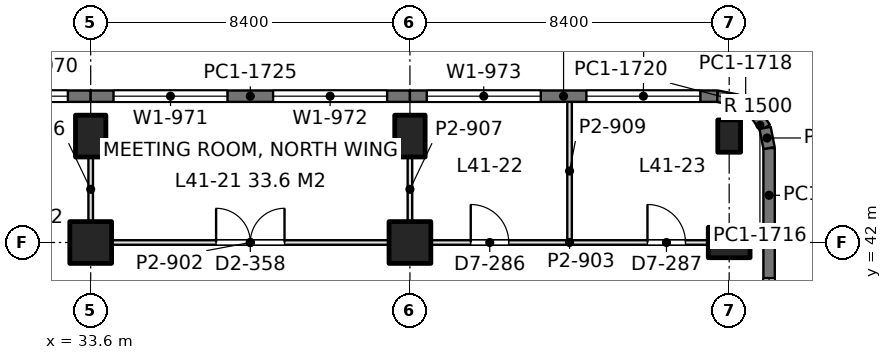
"""IFC4 building model, lengths in metres.
Left out: names, types, materials, properties, quantities, classifications, styles, units other than length and angle.
Written with IfcOpenShell. Run it as: python <this file> out.ifc"""

import sys

from ifc_helpers import new_model, si_unit, direction, frame, frame_2d, origin, origin_2d, place, context, subcontext, project, spatial, rectangle, extrude, element, fill, save


model = new_model("IFC4")
c1 = context("Model", 3, precision=1e-05, world=origin(), true_north=direction((0.0, 1.0)))
c2 = subcontext(c1, "Body", "Model", "MODEL_VIEW")
j1 = project(units=[si_unit("LENGTHUNIT", "METRE"), si_unit("PLANEANGLEUNIT", "RADIAN")], contexts=[c1])
p1 = place(None, origin())
s1 = spatial("IfcSite", under=j1, at=p1, CompositionType="ELEMENT")
p2 = place(p1, origin())
s2 = spatial("IfcBuilding", under=s1, at=p2, CompositionType="ELEMENT")
p3 = place(p2, frame((0.0, 0.0, 181.8)))
s3 = spatial("IfcBuildingStorey", under=s2, at=p3, CompositionType="ELEMENT", Elevation=181.8)
p4 = place(p3, frame((33.6, 42.0, 0.0), z_axis=(0.0, 0.0, 1.0), x_axis=(1.0, 0.0, 0.0)))
e1 = element("IfcColumn", 1, at=p4, inside=s3, PredefinedType="COLUMN", context=c2, shape_type="SweptSolid", body=[
    extrude(rectangle(XDim=1.1, YDim=1.1, at=origin_2d()), origin(), (0.0, 0.0, 1.0), 4.2),
])
p5 = place(p3, frame((33.6, 44.8, 0.0), z_axis=(0.0, 0.0, 1.0), x_axis=(1.0, 0.0, 0.0)))
e2 = element("IfcColumn", 2, at=p5, inside=s3, PredefinedType="COLUMN", context=c2, shape_type="SweptSolid", body=[
    extrude(rectangle(XDim=0.8, YDim=1.1, at=origin_2d()), origin(), (0.0, 0.0, 1.0), 4.2),
])
p6 = place(p3, frame((42.0, 42.0, 0.0), z_axis=(0.0, 0.0, 1.0), x_axis=(1.0, 0.0, 0.0)))
e3 = element("IfcColumn", 3, at=p6, inside=s3, PredefinedType="COLUMN", context=c2, shape_type="SweptSolid", body=[
    extrude(rectangle(XDim=1.1, YDim=1.1, at=origin_2d()), origin(), (0.0, 0.0, 1.0), 4.2),
])
for number, where, z_axis, x_axis in (
    (4, (42.0, 44.8, 0.0), (0.0, 0.0, 1.0), (1.0, 0.0, 0.0)),
    (5, (50.4, 42.0, 0.0), (0.0, 0.0, 1.0), (0.0, 1.0, 0.0)),
):
    element("IfcColumn", number, at=place(p3, frame(where, z_axis=z_axis, x_axis=x_axis)), inside=s3, PredefinedType="COLUMN", context=c2, shape_type="SweptSolid", body=[
        extrude(rectangle(XDim=0.8, YDim=1.1, at=origin_2d()), origin(), (0.0, 0.0, 1.0), 4.2),
    ])
p7 = place(p3, frame((50.4, 44.8, 0.0), z_axis=(0.0, 0.0, 1.0), x_axis=(1.0, 0.0, 0.0)))
e6 = element("IfcColumn", 6, at=p7, inside=s3, PredefinedType="COLUMN", context=c2, shape_type="SweptSolid", body=[
    extrude(rectangle(XDim=0.6, YDim=0.85, at=origin_2d()), origin(), (0.0, 0.0, 1.0), 4.2),
])
p8 = place(p3, frame((25.2, 45.85, 0.0), z_axis=(0.0, 0.0, 1.0), x_axis=(1.0, 0.0, 0.0)))
e7 = element("IfcWall", 7, at=p8, inside=s3, PredefinedType="SOLIDWALL", context=c2, shape_type="SweptSolid", body=[
    extrude(rectangle(XDim=8.4, YDim=0.3, at=frame_2d((4.2, 0.0))), origin(), (0.0, 0.0, 1.0), 4.05),
])
p9 = place(p8, frame((0.6, 0.0, 0.9)))
e8 = element("IfcOpeningElement", 8, at=p9, cuts=e7, PredefinedType="OPENING", context=c2, shape_type="SweptSolid", body=[
    extrude(rectangle(XDim=3.0, YDim=1.9, at=frame_2d((1.5, 0.95))), frame((0.0, 0.16, 0.0), z_axis=(0.0, -1.0, 0.0), x_axis=(1.0, 0.0, 0.0)), (0.0, 0.0, 1.0), 0.32),
])
p10 = place(p8, frame((4.8, 0.0, 0.9)))
e9 = element("IfcOpeningElement", 9, at=p10, cuts=e7, PredefinedType="OPENING", context=c2, shape_type="SweptSolid", body=[
    extrude(rectangle(XDim=3.0, YDim=1.9, at=frame_2d((1.5, 0.95))), frame((0.0, 0.16, 0.0), z_axis=(0.0, -1.0, 0.0), x_axis=(1.0, 0.0, 0.0)), (0.0, 0.0, 1.0), 0.32),
])
p11 = place(p3, frame((33.6, 45.85, 0.0), z_axis=(0.0, 0.0, 1.0), x_axis=(1.0, 0.0, 0.0)))
e10 = element("IfcWall", 10, at=p11, inside=s3, PredefinedType="SOLIDWALL", context=c2, shape_type="SweptSolid", body=[
    extrude(rectangle(XDim=8.4, YDim=0.3, at=frame_2d((4.2, 0.0))), origin(), (0.0, 0.0, 1.0), 4.05),
])
p12 = place(p11, frame((0.6, 0.0, 0.9)))
e11 = element("IfcOpeningElement", 11, at=p12, cuts=e10, PredefinedType="OPENING", context=c2, shape_type="SweptSolid", body=[
    extrude(rectangle(XDim=3.0, YDim=1.9, at=frame_2d((1.5, 0.95))), frame((0.0, 0.16, 0.0), z_axis=(0.0, -1.0, 0.0), x_axis=(1.0, 0.0, 0.0)), (0.0, 0.0, 1.0), 0.32),
])
p13 = place(p11, frame((4.8, 0.0, 0.9)))
e12 = element("IfcOpeningElement", 12, at=p13, cuts=e10, PredefinedType="OPENING", context=c2, shape_type="SweptSolid", body=[
    extrude(rectangle(XDim=3.0, YDim=1.9, at=frame_2d((1.5, 0.95))), frame((0.0, 0.16, 0.0), z_axis=(0.0, -1.0, 0.0), x_axis=(1.0, 0.0, 0.0)), (0.0, 0.0, 1.0), 0.32),
])
p14 = place(p3, frame((42.0, 45.85, 0.0), z_axis=(0.0, 0.0, 1.0), x_axis=(1.0, 0.0, 0.0)))
e13 = element("IfcWall", 13, at=p14, inside=s3, PredefinedType="SOLIDWALL", context=c2, shape_type="SweptSolid", body=[
    extrude(rectangle(XDim=8.085, YDim=0.3, at=frame_2d((4.042, 0.0))), origin(), (0.0, 0.0, 1.0), 4.05),
])
p15 = place(p14, frame((0.443, 0.0, 0.9)))
e14 = element("IfcOpeningElement", 14, at=p15, cuts=e13, PredefinedType="OPENING", context=c2, shape_type="SweptSolid", body=[
    extrude(rectangle(XDim=3.0, YDim=1.9, at=frame_2d((1.5, 0.95))), frame((0.0, 0.16, 0.0), z_axis=(0.0, -1.0, 0.0), x_axis=(1.0, 0.0, 0.0)), (0.0, 0.0, 1.0), 0.32),
])
p16 = place(p14, frame((4.643, 0.0, 0.9)))
e15 = element("IfcOpeningElement", 15, at=p16, cuts=e13, PredefinedType="OPENING", context=c2, shape_type="SweptSolid", body=[
    extrude(rectangle(XDim=3.0, YDim=1.9, at=frame_2d((1.5, 0.95))), frame((0.0, 0.16, 0.0), z_axis=(0.0, -1.0, 0.0), x_axis=(1.0, 0.0, 0.0)), (0.0, 0.0, 1.0), 0.32),
])
p17 = place(p3, frame((50.085, 45.85, 0.0), z_axis=(0.0, 0.0, 1.0), x_axis=(0.980702050465, -0.1955082817, 0.0)))
e16 = element("IfcWall", 16, at=p17, inside=s3, PredefinedType="SOLIDWALL", context=c2, shape_type="SweptSolid", body=[
    extrude(rectangle(XDim=0.541, YDim=0.3, at=frame_2d((0.271, 0.0))), origin(), (0.0, 0.0, 1.0), 4.05),
])
p18 = place(p3, frame((50.615, 45.744, 0.0), z_axis=(0.0, 0.0, 1.0), x_axis=(0.831692711774, -0.555236195849, 0.0)))
e17 = element("IfcWall", 17, at=p18, inside=s3, PredefinedType="SOLIDWALL", context=c2, shape_type="SweptSolid", body=[
    extrude(rectangle(XDim=0.525, YDim=0.3, at=frame_2d((0.263, 0.0))), origin(), (0.0, 0.0, 1.0), 4.05),
])
p19 = place(p3, frame((51.052, 45.453, 0.0), z_axis=(0.0, 0.0, 1.0), x_axis=(0.55534295404, -0.831621430339, 0.0)))
e18 = element("IfcWall", 18, at=p19, inside=s3, PredefinedType="SOLIDWALL", context=c2, shape_type="SweptSolid", body=[
    extrude(rectangle(XDim=0.526, YDim=0.3, at=frame_2d((0.263, 0.0))), origin(), (0.0, 0.0, 1.0), 4.05),
])
p20 = place(p3, frame((51.344, 45.015, 0.0), z_axis=(0.0, 0.0, 1.0), x_axis=(0.195073962632, -0.980788534345, 0.0)))
e19 = element("IfcWall", 19, at=p20, inside=s3, PredefinedType="SOLIDWALL", context=c2, shape_type="SweptSolid", body=[
    extrude(rectangle(XDim=0.541, YDim=0.3, at=frame_2d((0.271, 0.0))), origin(), (0.0, 0.0, 1.0), 4.05),
])
p21 = place(p3, frame((51.45, 44.485, 0.0), z_axis=(0.0, 0.0, 1.0), x_axis=(0.0, -1.0, 0.0)))
e20 = element("IfcWall", 20, at=p21, inside=s3, PredefinedType="SOLIDWALL", context=c2, shape_type="SweptSolid", body=[
    extrude(rectangle(XDim=2.485, YDim=0.3, at=frame_2d((1.243, 0.0))), origin(), (0.0, 0.0, 1.0), 4.05),
])
p22 = place(p3, frame((51.45, 42.0, 0.0), z_axis=(0.0, 0.0, 1.0), x_axis=(0.0, -1.0, 0.0)))
e21 = element("IfcWall", 21, at=p22, inside=s3, PredefinedType="SOLIDWALL", context=c2, shape_type="SweptSolid", body=[
    extrude(rectangle(XDim=4.275, YDim=0.3, at=frame_2d((2.137, 0.0))), origin(), (0.0, 0.0, 1.0), 4.05),
])
p23 = place(p22, frame((0.938, 0.0, 0.9)))
e22 = element("IfcOpeningElement", 22, at=p23, cuts=e21, PredefinedType="OPENING", context=c2, shape_type="SweptSolid", body=[
    extrude(rectangle(XDim=2.4, YDim=1.9, at=frame_2d((1.2, 0.95))), frame((0.0, 0.16, 0.0), z_axis=(0.0, -1.0, 0.0), x_axis=(1.0, 0.0, 0.0)), (0.0, 0.0, 1.0), 0.32),
])
p24 = place(p3, frame((34.149, 42.0, 0.0), z_axis=(0.0, 0.0, 1.0), x_axis=(1.0, 0.0, 0.0)))
e23 = element("IfcWall", 23, at=p24, inside=s3, PredefinedType="PARTITIONING", context=c2, shape_type="SweptSolid", body=[
    extrude(rectangle(XDim=7.302, YDim=0.12, at=frame_2d((3.651, 0.0))), origin(), (0.0, 0.0, 1.0), 3.55),
])
p25 = place(p24, frame((2.751, 0.0, 0.0)))
e24 = element("IfcOpeningElement", 24, at=p25, cuts=e23, PredefinedType="OPENING", context=c2, shape_type="SweptSolid", body=[
    extrude(rectangle(XDim=1.8, YDim=2.2, at=frame_2d((0.9, 1.1))), frame((0.0, 0.07, 0.0), z_axis=(0.0, -1.0, 0.0), x_axis=(1.0, 0.0, 0.0)), (0.0, 0.0, 1.0), 0.14),
])
p26 = place(p3, frame((42.549, 42.0, 0.0), z_axis=(0.0, 0.0, 1.0), x_axis=(1.0, 0.0, 0.0)))
e25 = element("IfcWall", 25, at=p26, inside=s3, PredefinedType="PARTITIONING", context=c2, shape_type="SweptSolid", body=[
    extrude(rectangle(XDim=7.302, YDim=0.12, at=frame_2d((3.651, 0.0))), origin(), (0.0, 0.0, 1.0), 3.55),
])
p27 = place(p26, frame((1.051, 0.0, 0.0)))
e26 = element("IfcOpeningElement", 26, at=p27, cuts=e25, PredefinedType="OPENING", context=c2, shape_type="SweptSolid", body=[
    extrude(rectangle(XDim=1.0, YDim=2.4, at=frame_2d((0.5, 1.2))), frame((0.0, 0.07, 0.0), z_axis=(0.0, -1.0, 0.0), x_axis=(1.0, 0.0, 0.0)), (0.0, 0.0, 1.0), 0.14),
])
p28 = place(p26, frame((5.701, 0.0, 0.0)))
e27 = element("IfcOpeningElement", 27, at=p28, cuts=e25, PredefinedType="OPENING", context=c2, shape_type="SweptSolid", body=[
    extrude(rectangle(XDim=1.0, YDim=2.4, at=frame_2d((0.5, 1.2))), frame((0.0, 0.07, 0.0), z_axis=(0.0, -1.0, 0.0), x_axis=(1.0, 0.0, 0.0)), (0.0, 0.0, 1.0), 0.14),
])
for number, where, z_axis, x_axis in (
    (28, (33.6, 42.549, 0.0), (0.0, 0.0, 1.0), (0.0, 1.0, 0.0)),
    (29, (42.0, 42.549, 0.0), (0.0, 0.0, 1.0), (0.0, 1.0, 0.0)),
):
    element("IfcWall", number, at=place(p3, frame(where, z_axis=z_axis, x_axis=x_axis)), inside=s3, PredefinedType="PARTITIONING", context=c2, shape_type="SweptSolid", body=[
        extrude(rectangle(XDim=1.702, YDim=0.12, at=frame_2d((0.851, 0.0))), origin(), (0.0, 0.0, 1.0), 3.69),
    ])
p29 = place(p3, frame((46.2, 42.058, 0.0), z_axis=(0.0, 0.0, 1.0), x_axis=(0.0, 1.0, 0.0)))
e30 = element("IfcWall", 30, at=p29, inside=s3, PredefinedType="PARTITIONING", context=c2, shape_type="SweptSolid", body=[
    extrude(rectangle(XDim=3.644, YDim=0.12, at=frame_2d((1.822, 0.0))), origin(), (0.0, 0.0, 1.0), 3.55),
])
p30 = place(p10, origin())
e31 = element("IfcWindow", 31, at=p30, inside=s3, PartitioningType="SINGLE_PANEL", PredefinedType="WINDOW", context=c2, shape_type="SweptSolid", body=[
    extrude(rectangle(XDim=3.0, YDim=1.9, at=frame_2d((1.5, 0.95))), frame((0.0, 0.03, 0.0), z_axis=(0.0, -1.0, 0.0), x_axis=(1.0, 0.0, 0.0)), (0.0, 0.0, 1.0), 0.06),
])
fill(e9, e31)
p31 = place(p12, origin())
e32 = element("IfcWindow", 32, at=p31, inside=s3, PartitioningType="SINGLE_PANEL", PredefinedType="WINDOW", context=c2, shape_type="SweptSolid", body=[
    extrude(rectangle(XDim=3.0, YDim=1.9, at=frame_2d((1.5, 0.95))), frame((0.0, 0.03, 0.0), z_axis=(0.0, -1.0, 0.0), x_axis=(1.0, 0.0, 0.0)), (0.0, 0.0, 1.0), 0.06),
])
fill(e11, e32)
p32 = place(p13, origin())
e33 = element("IfcWindow", 33, at=p32, inside=s3, PartitioningType="SINGLE_PANEL", PredefinedType="WINDOW", context=c2, shape_type="SweptSolid", body=[
    extrude(rectangle(XDim=3.0, YDim=1.9, at=frame_2d((1.5, 0.95))), frame((0.0, 0.03, 0.0), z_axis=(0.0, -1.0, 0.0), x_axis=(1.0, 0.0, 0.0)), (0.0, 0.0, 1.0), 0.06),
])
fill(e12, e33)
p33 = place(p15, origin())
e34 = element("IfcWindow", 34, at=p33, inside=s3, PartitioningType="SINGLE_PANEL", PredefinedType="WINDOW", context=c2, shape_type="SweptSolid", body=[
    extrude(rectangle(XDim=3.0, YDim=1.9, at=frame_2d((1.5, 0.95))), frame((0.0, 0.03, 0.0), z_axis=(0.0, -1.0, 0.0), x_axis=(1.0, 0.0, 0.0)), (0.0, 0.0, 1.0), 0.06),
])
fill(e14, e34)
p34 = place(p16, origin())
e35 = element("IfcWindow", 35, at=p34, inside=s3, PartitioningType="SINGLE_PANEL", PredefinedType="WINDOW", context=c2, shape_type="SweptSolid", body=[
    extrude(rectangle(XDim=3.0, YDim=1.9, at=frame_2d((1.5, 0.95))), frame((0.0, 0.03, 0.0), z_axis=(0.0, -1.0, 0.0), x_axis=(1.0, 0.0, 0.0)), (0.0, 0.0, 1.0), 0.06),
])
fill(e15, e35)
p35 = place(p23, origin())
e36 = element("IfcWindow", 36, at=p35, inside=s3, PartitioningType="SINGLE_PANEL", PredefinedType="WINDOW", context=c2, shape_type="SweptSolid", body=[
    extrude(rectangle(XDim=2.4, YDim=1.9, at=frame_2d((1.2, 0.95))), frame((0.0, 0.03, 0.0), z_axis=(0.0, -1.0, 0.0), x_axis=(1.0, 0.0, 0.0)), (0.0, 0.0, 1.0), 0.06),
])
fill(e22, e36)
p36 = place(p25, origin())
e37 = element("IfcDoor", 37, at=p36, inside=s3, OperationType="DOUBLE_DOOR_SINGLE_SWING", PredefinedType="DOOR", context=c2, shape_type="SweptSolid", body=[
    extrude(rectangle(XDim=1.8, YDim=2.2, at=frame_2d((0.9, 1.1))), frame((0.0, 0.025, 0.0), z_axis=(0.0, -1.0, 0.0), x_axis=(1.0, 0.0, 0.0)), (0.0, 0.0, 1.0), 0.05),
])
fill(e24, e37)
p37 = place(p27, origin())
e38 = element("IfcDoor", 38, at=p37, inside=s3, OperationType="SINGLE_SWING_LEFT", PredefinedType="DOOR", context=c2, shape_type="SweptSolid", body=[
    extrude(rectangle(XDim=1.0, YDim=2.4, at=frame_2d((0.5, 1.2))), frame((0.0, 0.025, 0.0), z_axis=(0.0, -1.0, 0.0), x_axis=(1.0, 0.0, 0.0)), (0.0, 0.0, 1.0), 0.05),
])
fill(e26, e38)
p38 = place(p28, origin())
e39 = element("IfcDoor", 39, at=p38, inside=s3, OperationType="SINGLE_SWING_LEFT", PredefinedType="DOOR", context=c2, shape_type="SweptSolid", body=[
    extrude(rectangle(XDim=1.0, YDim=2.4, at=frame_2d((0.5, 1.2))), frame((0.0, 0.025, 0.0), z_axis=(0.0, -1.0, 0.0), x_axis=(1.0, 0.0, 0.0)), (0.0, 0.0, 1.0), 0.05),
])
fill(e27, e39)
save(model, sys.argv[1])
